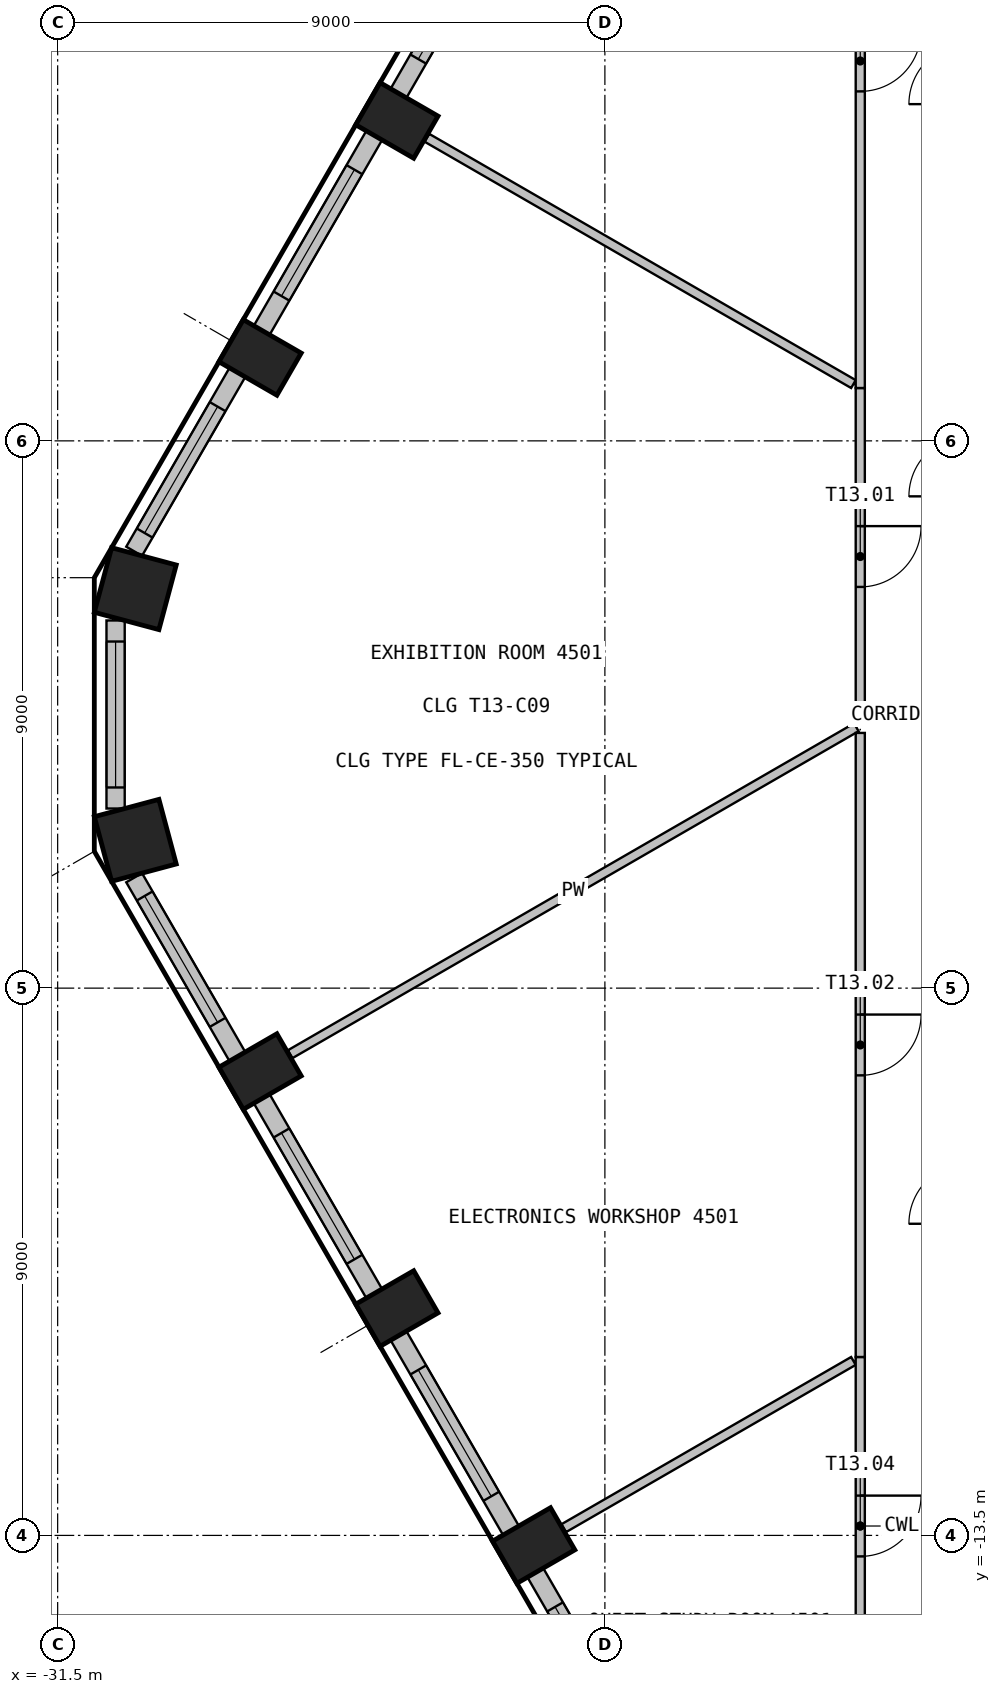
"""IFC4 building model, lengths in metres.
Left out: names, types, materials, properties, quantities, classifications, styles, units other than length and angle.
Written with IfcOpenShell. Run it as: python <this file> out.ifc"""

import sys

from ifc_helpers import new_model, si_unit, direction, frame, frame_2d, origin, origin_2d, place, context, subcontext, project, spatial, rectangle, extrude, element, fill, save


model = new_model("IFC4")
c1 = context("Model", 3, precision=1e-05, world=origin(), true_north=direction((0.0, 1.0)))
c2 = subcontext(c1, "Body", "Model", "MODEL_VIEW")
j1 = project(units=[si_unit("LENGTHUNIT", "METRE"), si_unit("PLANEANGLEUNIT", "RADIAN")], contexts=[c1])
p1 = place(None, origin())
s1 = spatial("IfcSite", under=j1, at=p1, CompositionType="ELEMENT")
p2 = place(p1, origin())
s2 = spatial("IfcBuilding", under=s1, at=p2, CompositionType="ELEMENT")
p3 = place(p2, frame((0.0, 0.0, 183.9)))
s3 = spatial("IfcBuildingStorey", under=s2, at=p3, CompositionType="ELEMENT", Elevation=183.9)
for number, where, z_axis, x_axis in (
    (1, (-25.921, 9.769, 0.0), (0.0, 0.0, 1.0), (-0.5, -0.866, 0.0)),
    (2, (-28.171, 5.872, 0.0), (0.0, 0.0, 1.0), (-0.5, -0.866, 0.0)),
):
    element("IfcColumn", number, at=place(p3, frame(where, z_axis=z_axis, x_axis=x_axis)), inside=s3, PredefinedType="COLUMN", context=c2, shape_type="SweptSolid", body=[
        extrude(rectangle(XDim=0.8, YDim=1.1, at=origin_2d()), origin(), (0.0, 0.0, 1.0), 3.55),
    ])
for number, where, z_axis, x_axis in (
    (3, (-30.223, 2.07, 0.0), (0.0, 0.0, 1.0), (-0.259, -0.966, 0.0)),
    (4, (-30.223, -2.07, 0.0), (0.0, 0.0, 1.0), (0.259, -0.966, 0.0)),
):
    element("IfcColumn", number, at=place(p3, frame(where, z_axis=z_axis, x_axis=x_axis)), inside=s3, PredefinedType="COLUMN", context=c2, shape_type="SweptSolid", body=[
        extrude(rectangle(XDim=1.1, YDim=1.1, at=origin_2d()), origin(), (0.0, 0.0, 1.0), 3.55),
    ])
for number, where, z_axis, x_axis in (
    (5, (-28.171, -5.872, 0.0), (0.0, 0.0, 1.0), (0.5, -0.866, 0.0)),
    (6, (-25.921, -9.769, 0.0), (0.0, 0.0, 1.0), (0.5, -0.866, 0.0)),
    (7, (-23.671, -13.666, 0.0), (0.0, 0.0, 1.0), (0.5, -0.866, 0.0)),
):
    element("IfcColumn", number, at=place(p3, frame(where, z_axis=z_axis, x_axis=x_axis)), inside=s3, PredefinedType="COLUMN", context=c2, shape_type="SweptSolid", body=[
        extrude(rectangle(XDim=0.8, YDim=1.1, at=origin_2d()), origin(), (0.0, 0.0, 1.0), 3.55),
    ])
p4 = place(p3, frame((-24.044, 13.419, 0.0), z_axis=(0.0, 0.0, 1.0), x_axis=(-0.500029062817, -0.866008623709, 0.0)))
e8 = element("IfcWall", 8, at=p4, inside=s3, PredefinedType="SOLIDWALL", context=c2, shape_type="SweptSolid", body=[
    extrude(rectangle(XDim=3.699, YDim=0.3, at=frame_2d((1.85, 0.0))), origin(), (0.0, 0.0, 1.0), 3.55),
])
p5 = place(p4, frame((0.649, 0.0, 0.9)))
e9 = element("IfcOpeningElement", 9, at=p5, cuts=e8, PredefinedType="OPENING", context=c2, shape_type="SweptSolid", body=[
    extrude(rectangle(XDim=2.4, YDim=2.1, at=frame_2d((1.2, 1.05))), frame((0.0, 0.16, 0.0), z_axis=(0.0, -1.0, 0.0), x_axis=(1.0, 0.0, 0.0)), (0.0, 0.0, 1.0), 0.32),
])
p6 = place(p3, frame((-26.294, 9.522, 0.0), z_axis=(0.0, 0.0, 1.0), x_axis=(-0.500029062817, -0.866008623709, 0.0)))
e10 = element("IfcWall", 10, at=p6, inside=s3, PredefinedType="SOLIDWALL", context=c2, shape_type="SweptSolid", body=[
    extrude(rectangle(XDim=3.699, YDim=0.3, at=frame_2d((1.85, 0.0))), origin(), (0.0, 0.0, 1.0), 3.55),
])
p7 = place(p6, frame((0.649, 0.0, 0.9)))
e11 = element("IfcOpeningElement", 11, at=p7, cuts=e10, PredefinedType="OPENING", context=c2, shape_type="SweptSolid", body=[
    extrude(rectangle(XDim=2.4, YDim=2.1, at=frame_2d((1.2, 1.05))), frame((0.0, 0.16, 0.0), z_axis=(0.0, -1.0, 0.0), x_axis=(1.0, 0.0, 0.0)), (0.0, 0.0, 1.0), 0.32),
])
p8 = place(p3, frame((-28.544, 5.625, 0.0), z_axis=(0.0, 0.0, 1.0), x_axis=(-0.500012868213, -0.866017974191, 0.0)))
e12 = element("IfcWall", 12, at=p8, inside=s3, PredefinedType="SOLIDWALL", context=c2, shape_type="SweptSolid", body=[
    extrude(rectangle(XDim=3.396, YDim=0.3, at=frame_2d((1.698, 0.0))), origin(), (0.0, 0.0, 1.0), 3.55),
])
p9 = place(p8, frame((0.649, 0.0, 0.9)))
e13 = element("IfcOpeningElement", 13, at=p9, cuts=e12, PredefinedType="OPENING", context=c2, shape_type="SweptSolid", body=[
    extrude(rectangle(XDim=2.4, YDim=2.1, at=frame_2d((1.2, 1.05))), frame((0.0, 0.16, 0.0), z_axis=(0.0, -1.0, 0.0), x_axis=(1.0, 0.0, 0.0)), (0.0, 0.0, 1.0), 0.32),
])
p10 = place(p3, frame((-30.547, 1.546, 0.0), z_axis=(0.0, 0.0, 1.0), x_axis=(0.0, -1.0, 0.0)))
e14 = element("IfcWall", 14, at=p10, inside=s3, PredefinedType="SOLIDWALL", context=c2, shape_type="SweptSolid", body=[
    extrude(rectangle(XDim=3.093, YDim=0.3, at=frame_2d((1.546, 0.0))), origin(), (0.0, 0.0, 1.0), 3.55),
])
p11 = place(p10, frame((0.346, 0.0, 0.9)))
e15 = element("IfcOpeningElement", 15, at=p11, cuts=e14, PredefinedType="OPENING", context=c2, shape_type="SweptSolid", body=[
    extrude(rectangle(XDim=2.4, YDim=2.1, at=frame_2d((1.2, 1.05))), frame((0.0, 0.16, 0.0), z_axis=(0.0, -1.0, 0.0), x_axis=(1.0, 0.0, 0.0)), (0.0, 0.0, 1.0), 0.32),
])
p12 = place(p3, frame((-30.242, -2.684, 0.0), z_axis=(0.0, 0.0, 1.0), x_axis=(0.500012868213, -0.866017974191, 0.0)))
e16 = element("IfcWall", 16, at=p12, inside=s3, PredefinedType="SOLIDWALL", context=c2, shape_type="SweptSolid", body=[
    extrude(rectangle(XDim=3.396, YDim=0.3, at=frame_2d((1.698, 0.0))), origin(), (0.0, 0.0, 1.0), 3.55),
])
p13 = place(p12, frame((0.346, 0.0, 0.9)))
e17 = element("IfcOpeningElement", 17, at=p13, cuts=e16, PredefinedType="OPENING", context=c2, shape_type="SweptSolid", body=[
    extrude(rectangle(XDim=2.4, YDim=2.1, at=frame_2d((1.2, 1.05))), frame((0.0, 0.16, 0.0), z_axis=(0.0, -1.0, 0.0), x_axis=(1.0, 0.0, 0.0)), (0.0, 0.0, 1.0), 0.32),
])
p14 = place(p3, frame((-28.144, -6.319, 0.0), z_axis=(0.0, 0.0, 1.0), x_axis=(0.500029062817, -0.866008623709, 0.0)))
e18 = element("IfcWall", 18, at=p14, inside=s3, PredefinedType="SOLIDWALL", context=c2, shape_type="SweptSolid", body=[
    extrude(rectangle(XDim=3.699, YDim=0.3, at=frame_2d((1.85, 0.0))), origin(), (0.0, 0.0, 1.0), 3.55),
])
p15 = place(p14, frame((0.649, 0.0, 0.9)))
e19 = element("IfcOpeningElement", 19, at=p15, cuts=e18, PredefinedType="OPENING", context=c2, shape_type="SweptSolid", body=[
    extrude(rectangle(XDim=2.4, YDim=2.1, at=frame_2d((1.2, 1.05))), frame((0.0, 0.16, 0.0), z_axis=(0.0, -1.0, 0.0), x_axis=(1.0, 0.0, 0.0)), (0.0, 0.0, 1.0), 0.32),
])
p16 = place(p3, frame((-25.894, -10.216, 0.0), z_axis=(0.0, 0.0, 1.0), x_axis=(0.500029062817, -0.866008623709, 0.0)))
e20 = element("IfcWall", 20, at=p16, inside=s3, PredefinedType="SOLIDWALL", context=c2, shape_type="SweptSolid", body=[
    extrude(rectangle(XDim=3.699, YDim=0.3, at=frame_2d((1.85, 0.0))), origin(), (0.0, 0.0, 1.0), 3.55),
])
p17 = place(p16, frame((0.649, 0.0, 0.9)))
e21 = element("IfcOpeningElement", 21, at=p17, cuts=e20, PredefinedType="OPENING", context=c2, shape_type="SweptSolid", body=[
    extrude(rectangle(XDim=2.4, YDim=2.1, at=frame_2d((1.2, 1.05))), frame((0.0, 0.16, 0.0), z_axis=(0.0, -1.0, 0.0), x_axis=(1.0, 0.0, 0.0)), (0.0, 0.0, 1.0), 0.32),
])
p18 = place(p3, frame((-23.644, -14.113, 0.0), z_axis=(0.0, 0.0, 1.0), x_axis=(0.500029062817, -0.866008623709, 0.0)))
e22 = element("IfcWall", 22, at=p18, inside=s3, PredefinedType="SOLIDWALL", context=c2, shape_type="SweptSolid", body=[
    extrude(rectangle(XDim=3.699, YDim=0.3, at=frame_2d((1.85, 0.0))), origin(), (0.0, 0.0, 1.0), 3.55),
])
p19 = place(p18, frame((0.649, 0.0, 0.9)))
e23 = element("IfcOpeningElement", 23, at=p19, cuts=e22, PredefinedType="OPENING", context=c2, shape_type="SweptSolid", body=[
    extrude(rectangle(XDim=2.4, YDim=2.1, at=frame_2d((1.2, 1.05))), frame((0.0, 0.16, 0.0), z_axis=(0.0, -1.0, 0.0), x_axis=(1.0, 0.0, 0.0)), (0.0, 0.0, 1.0), 0.32),
])
p20 = place(p3, frame((-18.365, -0.21, 0.0), z_axis=(0.0, 0.0, 1.0), x_axis=(-0.866008630453, -0.500029051137, 0.0)))
e24 = element("IfcWall", 24, at=p20, inside=s3, PredefinedType="PARTITIONING", context=c2, shape_type="SweptSolid", body=[
    extrude(rectangle(XDim=10.753, YDim=0.15, at=frame_2d((5.376, 0.0))), origin(), (0.0, 0.0, 1.0), 3.55),
])
p21 = place(p3, frame((-25.427, 9.484, 0.0), z_axis=(0.0, 0.0, 1.0), x_axis=(0.866017937352, -0.500012932018, 0.0)))
e25 = element("IfcWall", 25, at=p21, inside=s3, PredefinedType="PARTITIONING", context=c2, shape_type="SweptSolid", body=[
    extrude(rectangle(XDim=8.1, YDim=0.15, at=frame_2d((4.05, 0.0))), origin(), (0.0, 0.0, 1.0), 3.55),
])
p22 = place(p3, frame((-18.413, -10.631, 0.0), z_axis=(0.0, 0.0, 1.0), x_axis=(-0.866074743691, -0.499914531035, 0.0)))
e26 = element("IfcWall", 26, at=p22, inside=s3, PredefinedType="PARTITIONING", context=c2, shape_type="SweptSolid", body=[
    extrude(rectangle(XDim=5.501, YDim=0.15, at=frame_2d((2.751, 0.0))), origin(), (0.0, 0.0, 1.0), 3.55),
])
p23 = place(p3, frame((-18.3, -10.566, 0.0), z_axis=(0.0, 0.0, 1.0), x_axis=(0.0, -1.0, 0.0)))
e27 = element("IfcWall", 27, at=p23, inside=s3, PredefinedType="PARTITIONING", context=c2, shape_type="SweptSolid", body=[
    extrude(rectangle(XDim=5.559, YDim=0.15, at=frame_2d((2.78, 0.0))), origin(), (0.0, 0.0, 1.0), 3.55),
])
p24 = place(p23, frame((2.28, 0.0, 0.0)))
e28 = element("IfcOpeningElement", 28, at=p24, cuts=e27, PredefinedType="OPENING", context=c2, shape_type="SweptSolid", body=[
    extrude(rectangle(XDim=1.0, YDim=2.1, at=frame_2d((0.5, 1.05))), frame((0.0, 0.085, 0.0), z_axis=(0.0, -1.0, 0.0), x_axis=(1.0, 0.0, 0.0)), (0.0, 0.0, 1.0), 0.17),
])
p25 = place(p3, frame((-18.3, -0.303, 0.0), z_axis=(0.0, 0.0, 1.0), x_axis=(0.0, -1.0, 0.0)))
e29 = element("IfcWall", 29, at=p25, inside=s3, PredefinedType="PARTITIONING", context=c2, shape_type="SweptSolid", body=[
    extrude(rectangle(XDim=10.263, YDim=0.15, at=frame_2d((5.131, 0.0))), origin(), (0.0, 0.0, 1.0), 3.55),
])
p26 = place(p25, frame((4.632, 0.0, 0.0)))
e30 = element("IfcOpeningElement", 30, at=p26, cuts=e29, PredefinedType="OPENING", context=c2, shape_type="SweptSolid", body=[
    extrude(rectangle(XDim=1.0, YDim=2.1, at=frame_2d((0.5, 1.05))), frame((0.0, 0.085, 0.0), z_axis=(0.0, -1.0, 0.0), x_axis=(1.0, 0.0, 0.0)), (0.0, 0.0, 1.0), 0.17),
])
p27 = place(p3, frame((-18.3, 5.369, 0.0), z_axis=(0.0, 0.0, 1.0), x_axis=(0.0, -1.0, 0.0)))
e31 = element("IfcWall", 31, at=p27, inside=s3, PredefinedType="PARTITIONING", context=c2, shape_type="SweptSolid", body=[
    extrude(rectangle(XDim=5.542, YDim=0.15, at=frame_2d((2.771, 0.0))), origin(), (0.0, 0.0, 1.0), 3.55),
])
p28 = place(p27, frame((2.271, 0.0, 0.0)))
e32 = element("IfcOpeningElement", 32, at=p28, cuts=e31, PredefinedType="OPENING", context=c2, shape_type="SweptSolid", body=[
    extrude(rectangle(XDim=1.0, YDim=2.1, at=frame_2d((0.5, 1.05))), frame((0.0, 0.085, 0.0), z_axis=(0.0, -1.0, 0.0), x_axis=(1.0, 0.0, 0.0)), (0.0, 0.0, 1.0), 0.17),
])
p29 = place(p3, frame((-18.3, 16.125, 0.0), z_axis=(0.0, 0.0, 1.0), x_axis=(0.0, -1.0, 0.0)))
e33 = element("IfcWall", 33, at=p29, inside=s3, PredefinedType="PARTITIONING", context=c2, shape_type="SweptSolid", body=[
    extrude(rectangle(XDim=10.756, YDim=0.15, at=frame_2d((5.378, 0.0))), origin(), (0.0, 0.0, 1.0), 3.55),
])
p30 = place(p29, frame((4.878, 0.0, 0.0)))
e34 = element("IfcOpeningElement", 34, at=p30, cuts=e33, PredefinedType="OPENING", context=c2, shape_type="SweptSolid", body=[
    extrude(rectangle(XDim=1.0, YDim=2.1, at=frame_2d((0.5, 1.05))), frame((0.0, 0.085, 0.0), z_axis=(0.0, -1.0, 0.0), x_axis=(1.0, 0.0, 0.0)), (0.0, 0.0, 1.0), 0.17),
])
p31 = place(p5, origin())
e35 = element("IfcWindow", 35, at=p31, inside=s3, PartitioningType="SINGLE_PANEL", PredefinedType="WINDOW", context=c2, shape_type="SweptSolid", body=[
    extrude(rectangle(XDim=2.4, YDim=2.1, at=frame_2d((1.2, 1.05))), frame((0.0, 0.03, 0.0), z_axis=(0.0, -1.0, 0.0), x_axis=(1.0, 0.0, 0.0)), (0.0, 0.0, 1.0), 0.06),
])
fill(e9, e35)
p32 = place(p7, origin())
e36 = element("IfcWindow", 36, at=p32, inside=s3, PartitioningType="SINGLE_PANEL", PredefinedType="WINDOW", context=c2, shape_type="SweptSolid", body=[
    extrude(rectangle(XDim=2.4, YDim=2.1, at=frame_2d((1.2, 1.05))), frame((0.0, 0.03, 0.0), z_axis=(0.0, -1.0, 0.0), x_axis=(1.0, 0.0, 0.0)), (0.0, 0.0, 1.0), 0.06),
])
fill(e11, e36)
p33 = place(p9, origin())
e37 = element("IfcWindow", 37, at=p33, inside=s3, PartitioningType="SINGLE_PANEL", PredefinedType="WINDOW", context=c2, shape_type="SweptSolid", body=[
    extrude(rectangle(XDim=2.4, YDim=2.1, at=frame_2d((1.2, 1.05))), frame((0.0, 0.03, 0.0), z_axis=(0.0, -1.0, 0.0), x_axis=(1.0, 0.0, 0.0)), (0.0, 0.0, 1.0), 0.06),
])
fill(e13, e37)
p34 = place(p11, origin())
e38 = element("IfcWindow", 38, at=p34, inside=s3, PartitioningType="SINGLE_PANEL", PredefinedType="WINDOW", context=c2, shape_type="SweptSolid", body=[
    extrude(rectangle(XDim=2.4, YDim=2.1, at=frame_2d((1.2, 1.05))), frame((0.0, 0.03, 0.0), z_axis=(0.0, -1.0, 0.0), x_axis=(1.0, 0.0, 0.0)), (0.0, 0.0, 1.0), 0.06),
])
fill(e15, e38)
p35 = place(p13, origin())
e39 = element("IfcWindow", 39, at=p35, inside=s3, PartitioningType="SINGLE_PANEL", PredefinedType="WINDOW", context=c2, shape_type="SweptSolid", body=[
    extrude(rectangle(XDim=2.4, YDim=2.1, at=frame_2d((1.2, 1.05))), frame((0.0, 0.03, 0.0), z_axis=(0.0, -1.0, 0.0), x_axis=(1.0, 0.0, 0.0)), (0.0, 0.0, 1.0), 0.06),
])
fill(e17, e39)
p36 = place(p15, origin())
e40 = element("IfcWindow", 40, at=p36, inside=s3, PartitioningType="SINGLE_PANEL", PredefinedType="WINDOW", context=c2, shape_type="SweptSolid", body=[
    extrude(rectangle(XDim=2.4, YDim=2.1, at=frame_2d((1.2, 1.05))), frame((0.0, 0.03, 0.0), z_axis=(0.0, -1.0, 0.0), x_axis=(1.0, 0.0, 0.0)), (0.0, 0.0, 1.0), 0.06),
])
fill(e19, e40)
p37 = place(p17, origin())
e41 = element("IfcWindow", 41, at=p37, inside=s3, PartitioningType="SINGLE_PANEL", PredefinedType="WINDOW", context=c2, shape_type="SweptSolid", body=[
    extrude(rectangle(XDim=2.4, YDim=2.1, at=frame_2d((1.2, 1.05))), frame((0.0, 0.03, 0.0), z_axis=(0.0, -1.0, 0.0), x_axis=(1.0, 0.0, 0.0)), (0.0, 0.0, 1.0), 0.06),
])
fill(e21, e41)
p38 = place(p19, origin())
e42 = element("IfcWindow", 42, at=p38, inside=s3, PartitioningType="SINGLE_PANEL", PredefinedType="WINDOW", context=c2, shape_type="SweptSolid", body=[
    extrude(rectangle(XDim=2.4, YDim=2.1, at=frame_2d((1.2, 1.05))), frame((0.0, 0.03, 0.0), z_axis=(0.0, -1.0, 0.0), x_axis=(1.0, 0.0, 0.0)), (0.0, 0.0, 1.0), 0.06),
])
fill(e23, e42)
p39 = place(p28, origin())
e43 = element("IfcDoor", 43, at=p39, inside=s3, OperationType="SINGLE_SWING_LEFT", PredefinedType="DOOR", context=c2, shape_type="SweptSolid", body=[
    extrude(rectangle(XDim=1.0, YDim=2.1, at=frame_2d((0.5, 1.05))), frame((0.0, 0.025, 0.0), z_axis=(0.0, -1.0, 0.0), x_axis=(1.0, 0.0, 0.0)), (0.0, 0.0, 1.0), 0.05),
])
fill(e32, e43)
p40 = place(p26, origin())
e44 = element("IfcDoor", 44, at=p40, inside=s3, OperationType="SINGLE_SWING_RIGHT", PredefinedType="DOOR", context=c2, shape_type="SweptSolid", body=[
    extrude(rectangle(XDim=1.0, YDim=2.1, at=frame_2d((0.5, 1.05))), frame((0.0, 0.025, 0.0), z_axis=(0.0, -1.0, 0.0), x_axis=(1.0, 0.0, 0.0)), (0.0, 0.0, 1.0), 0.05),
])
fill(e30, e44)
p41 = place(p30, origin())
e45 = element("IfcDoor", 45, at=p41, inside=s3, OperationType="SINGLE_SWING_LEFT", PredefinedType="DOOR", context=c2, shape_type="SweptSolid", body=[
    extrude(rectangle(XDim=1.0, YDim=2.1, at=frame_2d((0.5, 1.05))), frame((0.0, 0.025, 0.0), z_axis=(0.0, -1.0, 0.0), x_axis=(1.0, 0.0, 0.0)), (0.0, 0.0, 1.0), 0.05),
])
fill(e34, e45)
p42 = place(p24, origin())
e46 = element("IfcDoor", 46, at=p42, inside=s3, OperationType="SINGLE_SWING_RIGHT", PredefinedType="DOOR", context=c2, shape_type="SweptSolid", body=[
    extrude(rectangle(XDim=1.0, YDim=2.1, at=frame_2d((0.5, 1.05))), frame((0.0, 0.025, 0.0), z_axis=(0.0, -1.0, 0.0), x_axis=(1.0, 0.0, 0.0)), (0.0, 0.0, 1.0), 0.05),
])
fill(e28, e46)
save(model, sys.argv[1])
